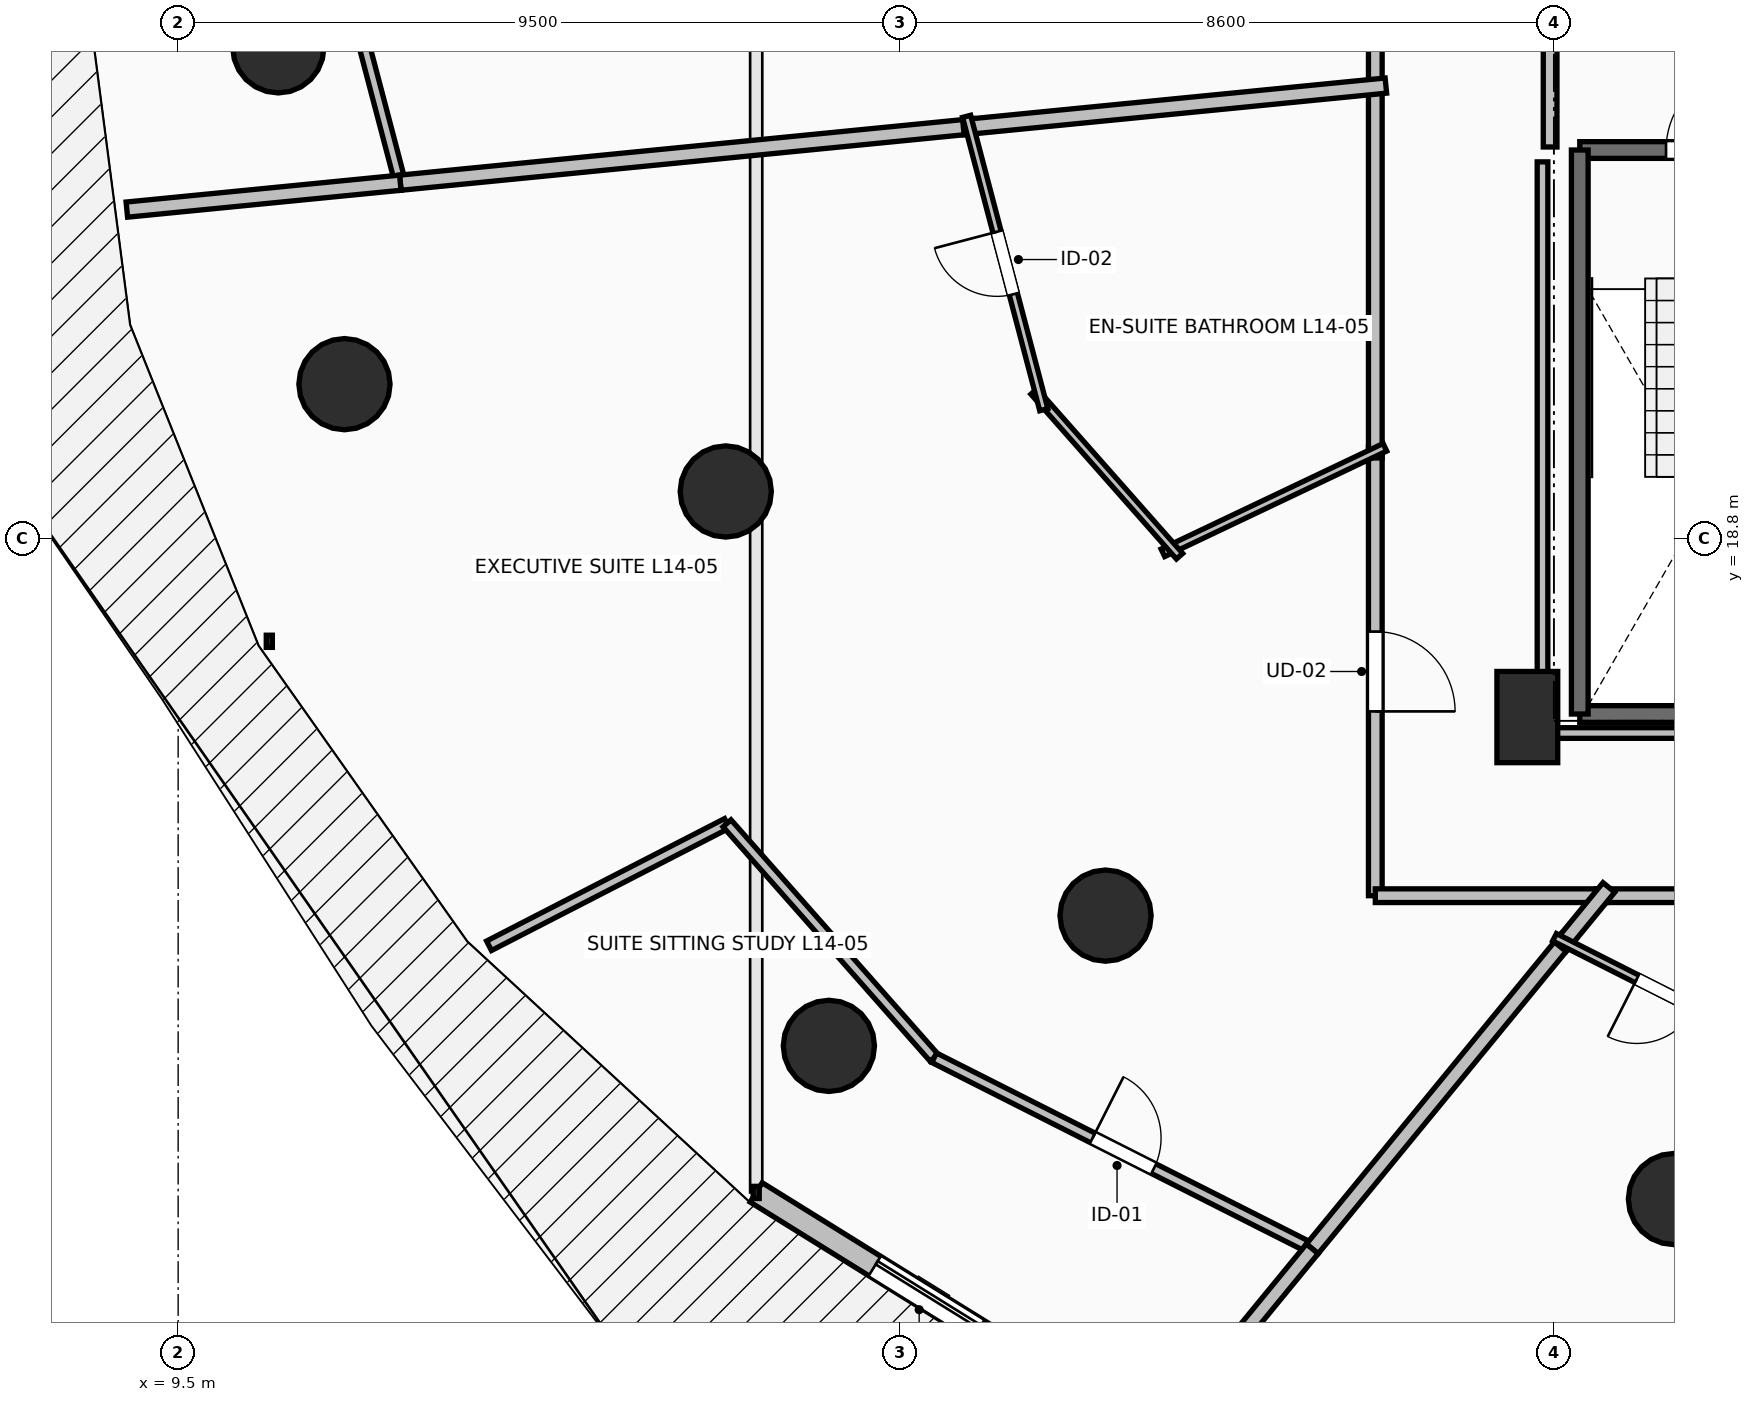
"""IFC4 building model, lengths in metres.
Left out: names, types, materials, properties, quantities, classifications, styles, units other than length and angle.
Written with IfcOpenShell. Run it as: python <this file> out.ifc"""

import sys

from ifc_helpers import new_model, si_unit, direction, frame, frame_2d, origin, origin_2d, place, context, subcontext, project, spatial, rectangle, circle, extrude, element, fill, save


model = new_model("IFC4")
c1 = context("Model", 3, precision=1e-05, world=origin(), true_north=direction((0.0, 1.0)))
c2 = subcontext(c1, "Body", "Model", "MODEL_VIEW")
j1 = project(units=[si_unit("LENGTHUNIT", "METRE"), si_unit("PLANEANGLEUNIT", "RADIAN")], contexts=[c1])
p1 = place(None, origin())
s1 = spatial("IfcSite", under=j1, at=p1, CompositionType="ELEMENT")
p2 = place(p1, origin())
s2 = spatial("IfcBuilding", under=s1, at=p2, CompositionType="ELEMENT")
p3 = place(p2, frame((0.0, 0.0, 55.5)))
s3 = spatial("IfcBuildingStorey", under=s2, at=p3, CompositionType="ELEMENT", Elevation=55.5)
for number, where, z_axis, x_axis in (
    (1, (16.705, 19.418, 0.0), (0.0, 0.0, 1.0), (-0.924, -0.383, 0.0)),
    (2, (21.701, 13.838, 0.0), (0.0, 0.0, 1.0), (-0.707, -0.707, 0.0)),
    (3, (29.179, 10.109, 0.0), (0.0, 0.0, 1.0), (-0.383, -0.924, 0.0)),
    (4, (10.818, 25.261, 0.0), (0.0, 0.0, 1.0), (-1.0, 0.0, 0.0)),
    (5, (11.688, 20.83, 0.0), (0.0, 0.0, 1.0), (-0.924, -0.383, 0.0)),
    (6, (18.061, 12.124, 0.0), (0.0, 0.0, 1.0), (-0.707, -0.707, 0.0)),
):
    element("IfcColumn", number, at=place(p3, frame(where, z_axis=z_axis, x_axis=x_axis)), inside=s3, PredefinedType="COLUMN", context=c2, shape_type="SweptSolid", body=[
        extrude(circle(Radius=0.6, at=origin_2d()), origin(), (0.0, 0.0, 1.0), 3.5),
    ])
p4 = place(p3, frame((27.25, 16.45, 0.0), z_axis=(0.0, 0.0, 1.0), x_axis=(1.0, 0.0, 0.0)))
e7 = element("IfcColumn", 7, at=p4, inside=s3, PredefinedType="PILASTER", context=c2, shape_type="SweptSolid", body=[
    extrude(rectangle(XDim=0.8, YDim=1.2, at=origin_2d()), origin(), (0.0, 0.0, 1.0), 3.5),
])
p5 = place(p3, frame((17.105, 10.196, 0.0), z_axis=(0.0, 0.0, 1.0), x_axis=(0.849633724826, -0.527373239404, 0.0)))
e8 = element("IfcWall", 8, at=p5, inside=s3, PredefinedType="STANDARD", context=c2, shape_type="SweptSolid", body=[
    extrude(rectangle(XDim=5.271, YDim=0.3, at=frame_2d((2.635, 0.0))), origin(), (0.0, 0.0, 1.0), 3.24),
])
p6 = place(p5, frame((1.835, 0.0, 0.0)))
e9 = element("IfcOpeningElement", 9, at=p6, cuts=e8, PredefinedType="OPENING", context=c2, shape_type="SweptSolid", body=[
    extrude(rectangle(XDim=1.6, YDim=2.3, at=frame_2d((0.8, 1.15))), frame((0.0, 0.165, 0.0), z_axis=(0.0, -1.0, 0.0), x_axis=(1.0, 0.0, 0.0)), (0.0, 0.0, 1.0), 0.33),
])
p7 = place(p3, frame((27.94, 23.91, 0.0), z_axis=(0.0, 0.0, 1.0), x_axis=(1.0, 0.0, 0.0)))
e10 = element("IfcWall", 10, at=p7, inside=s3, PredefinedType="SOLIDWALL", context=c2, shape_type="SweptSolid", body=[
    extrude(rectangle(XDim=3.37, YDim=0.22, at=frame_2d((1.685, 0.0))), origin(), (0.0, 0.0, 1.0), 3.24),
])
p8 = place(p7, frame((1.135, 0.0, 0.0)))
e11 = element("IfcOpeningElement", 11, at=p8, cuts=e10, PredefinedType="OPENING", context=c2, shape_type="SweptSolid", body=[
    extrude(rectangle(XDim=1.1, YDim=2.15, at=frame_2d((0.55, 1.075))), frame((0.0, 0.125, 0.0), z_axis=(0.0, -1.0, 0.0), x_axis=(1.0, 0.0, 0.0)), (0.0, 0.0, 1.0), 0.25),
])
p9 = place(p3, frame((31.31, 16.49, 0.0), z_axis=(0.0, 0.0, 1.0), x_axis=(-1.0, 0.0, 0.0)))
e12 = element("IfcWall", 12, at=p9, inside=s3, PredefinedType="SOLIDWALL", context=c2, shape_type="SweptSolid", body=[
    extrude(rectangle(XDim=3.37, YDim=0.22, at=frame_2d((1.685, 0.0))), origin(), (0.0, 0.0, 1.0), 3.24),
])
p10 = place(p3, frame((27.94, 16.49, 0.0), z_axis=(0.0, 0.0, 1.0), x_axis=(0.0, 1.0, 0.0)))
e13 = element("IfcWall", 13, at=p10, inside=s3, PredefinedType="SOLIDWALL", context=c2, shape_type="SweptSolid", body=[
    extrude(rectangle(XDim=7.42, YDim=0.22, at=frame_2d((3.71, 0.0))), origin(), (0.0, 0.0, 1.0), 3.24),
])
p11 = place(p3, frame((27.55, 28.0, 0.0), z_axis=(0.0, 0.0, 1.0), x_axis=(0.0, -1.0, 0.0)))
e14 = element("IfcWall", 14, at=p11, inside=s3, PredefinedType="PARTITIONING", context=c2, shape_type="SweptSolid", body=[
    extrude(rectangle(XDim=4.05, YDim=0.18, at=frame_2d((2.025, 0.0))), origin(), (0.0, 0.0, 1.0), 3.24),
])
p12 = place(p11, frame((1.425, 0.0, 0.0)))
e15 = element("IfcOpeningElement", 15, at=p12, cuts=e14, PredefinedType="OPENING", context=c2, shape_type="SweptSolid", body=[
    extrude(rectangle(XDim=1.2, YDim=2.15, at=frame_2d((0.6, 1.075))), frame((0.0, 0.105, 0.0), z_axis=(0.0, -1.0, 0.0), x_axis=(1.0, 0.0, 0.0)), (0.0, 0.0, 1.0), 0.21),
])
p13 = place(p3, frame((25.25, 30.598, 0.0), z_axis=(0.0, 0.0, 1.0), x_axis=(0.0, -1.0, 0.0)))
e16 = element("IfcWall", 16, at=p13, inside=s3, PredefinedType="PARTITIONING", context=c2, shape_type="SweptSolid", body=[
    extrude(rectangle(XDim=5.914, YDim=0.18, at=frame_2d((2.957, 0.0))), origin(), (0.0, 0.0, 1.0), 2.432),
])
p14 = place(p13, frame((2.432, 0.0, 0.0)))
e17 = element("IfcOpeningElement", 17, at=p14, cuts=e16, PredefinedType="OPENING", context=c2, shape_type="SweptSolid", body=[
    extrude(rectangle(XDim=1.05, YDim=2.2, at=frame_2d((0.525, 1.1))), frame((0.0, 0.105, 0.0), z_axis=(0.0, -1.0, 0.0), x_axis=(1.0, 0.0, 0.0)), (0.0, 0.0, 1.0), 0.21),
])
p15 = place(p3, frame((25.25, 19.999, 0.0), z_axis=(0.0, 0.0, 1.0), x_axis=(0.0, -1.0, 0.0)))
e18 = element("IfcWall", 18, at=p15, inside=s3, PredefinedType="PARTITIONING", context=c2, shape_type="SweptSolid", body=[
    extrude(rectangle(XDim=5.899, YDim=0.18, at=frame_2d((2.949, 0.0))), origin(), (0.0, 0.0, 1.0), 2.432),
])
p16 = place(p15, frame((2.425, 0.0, 0.0)))
e19 = element("IfcOpeningElement", 19, at=p16, cuts=e18, PredefinedType="OPENING", context=c2, shape_type="SweptSolid", body=[
    extrude(rectangle(XDim=1.05, YDim=2.2, at=frame_2d((0.525, 1.1))), frame((0.0, 0.105, 0.0), z_axis=(0.0, -1.0, 0.0), x_axis=(1.0, 0.0, 0.0)), (0.0, 0.0, 1.0), 0.21),
])
p17 = place(p3, frame((25.25, 14.1, 0.0), z_axis=(0.0, 0.0, 1.0), x_axis=(1.0, 0.0, 0.0)))
e20 = element("IfcWall", 20, at=p17, inside=s3, PredefinedType="PARTITIONING", context=c2, shape_type="SweptSolid", body=[
    extrude(rectangle(XDim=3.044, YDim=0.18, at=frame_2d((1.522, 0.0))), origin(), (0.0, 0.0, 1.0), 2.432),
])
p18 = place(p3, frame((25.25, 24.824, 0.0), z_axis=(0.0, 0.0, 1.0), x_axis=(0.0, -1.0, 0.0)))
e21 = element("IfcWall", 21, at=p18, inside=s3, PredefinedType="PARTITIONING", context=c2, shape_type="SweptSolid", body=[
    extrude(rectangle(XDim=4.965, YDim=0.18, at=frame_2d((2.482, 0.0))), origin(), (0.0, 0.0, 1.0), 3.24),
])
p19 = place(p3, frame((28.154, 14.1, 0.0), z_axis=(0.0, 0.0, 1.0), x_axis=(1.0, 0.0, 0.0)))
e22 = element("IfcWall", 22, at=p19, inside=s3, PredefinedType="PARTITIONING", context=c2, shape_type="SweptSolid", body=[
    extrude(rectangle(XDim=5.69, YDim=0.18, at=frame_2d((2.845, 0.0))), origin(), (0.0, 0.0, 1.0), 2.432),
])
p20 = place(p3, frame((11.76, 26.0, 0.0), z_axis=(0.0, 0.0, 1.0), x_axis=(0.254465628682, -0.967081818576, 0.0)))
e23 = element("IfcWall", 23, at=p20, inside=s3, PredefinedType="PARTITIONING", context=c2, shape_type="SweptSolid", body=[
    extrude(rectangle(XDim=2.606, YDim=0.14, at=frame_2d((1.303, 0.0))), origin(), (0.0, 0.0, 1.0), 2.432),
])
p21 = place(p3, frame((12.423, 23.48, 0.0), z_axis=(0.0, 0.0, 1.0), x_axis=(0.995173937517, 0.098126622721, 0.0)))
e24 = element("IfcWall", 24, at=p21, inside=s3, PredefinedType="PARTITIONING", context=c2, shape_type="SweptSolid", body=[
    extrude(rectangle(XDim=7.583, YDim=0.2, at=frame_2d((3.792, 0.0))), origin(), (0.0, 0.0, 1.0), 2.886),
])
p22 = place(p3, frame((19.831, 24.21, 0.0), z_axis=(0.0, 0.0, 1.0), x_axis=(0.995182391057, 0.098040851333, 0.0)))
e25 = element("IfcWall", 25, at=p22, inside=s3, PredefinedType="PARTITIONING", context=c2, shape_type="SweptSolid", body=[
    extrude(rectangle(XDim=5.585, YDim=0.2, at=frame_2d((2.793, 0.0))), origin(), (0.0, 0.0, 1.0), 2.929),
])
p23 = place(p3, frame((8.825, 23.126, 0.0), z_axis=(0.0, 0.0, 1.0), x_axis=(0.995195038103, 0.097912390097, 0.0)))
e26 = element("IfcWall", 26, at=p23, inside=s3, PredefinedType="PARTITIONING", context=c2, shape_type="SweptSolid", body=[
    extrude(rectangle(XDim=3.615, YDim=0.2, at=frame_2d((1.808, 0.0))), origin(), (0.0, 0.0, 1.0), 2.624),
])
p24 = place(p3, frame((25.376, 19.999, 0.0), z_axis=(0.0, 0.0, 1.0), x_axis=(-0.903186785932, -0.429247748647, 0.0)))
e27 = element("IfcWall", 27, at=p24, inside=s3, PredefinedType="PARTITIONING", context=c2, shape_type="SweptSolid", body=[
    extrude(rectangle(XDim=3.234, YDim=0.11, at=frame_2d((1.617, 0.0))), origin(), (0.0, 0.0, 1.0), 2.929),
])
p25 = place(p3, frame((22.675, 18.566, 0.0), z_axis=(0.0, 0.0, 1.0), x_axis=(-0.661981720099, 0.749519981224, 0.0)))
e28 = element("IfcWall", 28, at=p25, inside=s3, PredefinedType="PARTITIONING", context=c2, shape_type="SweptSolid", body=[
    extrude(rectangle(XDim=2.892, YDim=0.11, at=frame_2d((1.446, 0.0))), origin(), (0.0, 0.0, 1.0), 2.929),
])
p26 = place(p3, frame((20.889, 20.494, 0.0), z_axis=(0.0, 0.0, 1.0), x_axis=(-0.254405980461, 0.967097511684, 0.0)))
e29 = element("IfcWall", 29, at=p26, inside=s3, PredefinedType="PARTITIONING", context=c2, shape_type="SweptSolid", body=[
    extrude(rectangle(XDim=3.991, YDim=0.11, at=frame_2d((1.996, 0.0))), origin(), (0.0, 0.0, 1.0), 3.24),
])
p27 = place(p26, frame((1.571, 0.0, 0.0)))
e30 = element("IfcOpeningElement", 30, at=p27, cuts=e29, PredefinedType="OPENING", context=c2, shape_type="SweptSolid", body=[
    extrude(rectangle(XDim=0.85, YDim=2.1, at=frame_2d((0.425, 1.05))), frame((0.0, 0.07, 0.0), z_axis=(0.0, -1.0, 0.0), x_axis=(1.0, 0.0, 0.0)), (0.0, 0.0, 1.0), 0.14),
])
p28 = place(p3, frame((13.59, 13.441, 0.0), z_axis=(0.0, 0.0, 1.0), x_axis=(0.889180616302, 0.457556369852, 0.0)))
e31 = element("IfcWall", 31, at=p28, inside=s3, PredefinedType="PARTITIONING", context=c2, shape_type="SweptSolid", body=[
    extrude(rectangle(XDim=3.521, YDim=0.14, at=frame_2d((1.76, 0.0))), origin(), (0.0, 0.0, 1.0), 2.624),
])
p29 = place(p3, frame((16.721, 15.052, 0.0), z_axis=(0.0, 0.0, 1.0), x_axis=(0.662159063844, -0.749363312532, 0.0)))
e32 = element("IfcWall", 32, at=p29, inside=s3, PredefinedType="PARTITIONING", context=c2, shape_type="SweptSolid", body=[
    extrude(rectangle(XDim=4.115, YDim=0.14, at=frame_2d((2.058, 0.0))), origin(), (0.0, 0.0, 1.0), 2.432),
])
p30 = place(p3, frame((19.446, 11.968, 0.0), z_axis=(0.0, 0.0, 1.0), x_axis=(0.892518178955, -0.451011419184, 0.0)))
e33 = element("IfcWall", 33, at=p30, inside=s3, PredefinedType="PARTITIONING", context=c2, shape_type="SweptSolid", body=[
    extrude(rectangle(XDim=5.574, YDim=0.14, at=frame_2d((2.787, 0.0))), origin(), (0.0, 0.0, 1.0), 3.24),
])
p31 = place(p30, frame((2.337, 0.0, 0.0)))
e34 = element("IfcOpeningElement", 34, at=p31, cuts=e33, PredefinedType="OPENING", context=c2, shape_type="SweptSolid", body=[
    extrude(rectangle(XDim=0.9, YDim=2.1, at=frame_2d((0.45, 1.05))), frame((0.0, 0.085, 0.0), z_axis=(0.0, -1.0, 0.0), x_axis=(1.0, 0.0, 0.0)), (0.0, 0.0, 1.0), 0.17),
])
p32 = place(p3, frame((24.421, 9.454, 0.0), z_axis=(0.0, 0.0, 1.0), x_axis=(0.634420016008, 0.772988514332, 0.0)))
e35 = element("IfcWall", 35, at=p32, inside=s3, PredefinedType="PARTITIONING", context=c2, shape_type="SweptSolid", body=[
    extrude(rectangle(XDim=5.282, YDim=0.2, at=frame_2d((2.641, 0.0))), origin(), (0.0, 0.0, 1.0), 2.886),
])
p33 = place(p3, frame((27.683, 13.429, 0.0), z_axis=(0.0, 0.0, 1.0), x_axis=(0.634186727441, 0.77317992391, 0.0)))
e36 = element("IfcWall", 36, at=p33, inside=s3, PredefinedType="PARTITIONING", context=c2, shape_type="SweptSolid", body=[
    extrude(rectangle(XDim=1.008, YDim=0.2, at=frame_2d((0.504, 0.0))), origin(), (0.0, 0.0, 1.0), 2.432),
])
p34 = place(p3, frame((22.46, 7.065, 0.0), z_axis=(0.0, 0.0, 1.0), x_axis=(0.634432805544, 0.772978017313, 0.0)))
e37 = element("IfcWall", 37, at=p34, inside=s3, PredefinedType="PARTITIONING", context=c2, shape_type="SweptSolid", body=[
    extrude(rectangle(XDim=3.091, YDim=0.2, at=frame_2d((1.545, 0.0))), origin(), (0.0, 0.0, 1.0), 2.624),
])
p35 = place(p3, frame((30.533, 12.075, 0.0), z_axis=(0.0, 0.0, 1.0), x_axis=(-0.892451870397, 0.451142614952, 0.0)))
e38 = element("IfcWall", 38, at=p35, inside=s3, PredefinedType="PARTITIONING", context=c2, shape_type="SweptSolid", body=[
    extrude(rectangle(XDim=3.277, YDim=0.11, at=frame_2d((1.639, 0.0))), origin(), (0.0, 0.0, 1.0), 2.432),
])
p36 = place(p35, frame((1.214, 0.0, 0.0)))
e39 = element("IfcOpeningElement", 39, at=p36, cuts=e38, PredefinedType="OPENING", context=c2, shape_type="SweptSolid", body=[
    extrude(rectangle(XDim=0.85, YDim=2.1, at=frame_2d((0.425, 1.05))), frame((0.0, 0.07, 0.0), z_axis=(0.0, -1.0, 0.0), x_axis=(1.0, 0.0, 0.0)), (0.0, 0.0, 1.0), 0.14),
])
p37 = place(p3, frame((31.195, 16.24, 0.0), z_axis=(0.0, 0.0, 1.0), x_axis=(-1.0, 0.0, 0.0)))
e40 = element("IfcWall", 40, at=p37, inside=s3, PredefinedType="PARTITIONING", context=c2, shape_type="SweptSolid", body=[
    extrude(rectangle(XDim=3.745, YDim=0.14, at=frame_2d((1.873, 0.0))), origin(), (0.0, 0.0, 1.0), 2.432),
])
p38 = place(p3, frame((27.45, 16.24, 0.0), z_axis=(0.0, 0.0, 1.0), x_axis=(0.0, 1.0, 0.0)))
e41 = element("IfcWall", 41, at=p38, inside=s3, PredefinedType="PARTITIONING", context=c2, shape_type="SweptSolid", body=[
    extrude(rectangle(XDim=7.514, YDim=0.14, at=frame_2d((3.757, 0.0))), origin(), (0.0, 0.0, 1.0), 2.432),
])
p39 = place(p6, origin())
e42 = element("IfcDoor", 42, at=p39, inside=s3, OperationType="SLIDING_TO_LEFT", PredefinedType="DOOR", context=c2, shape_type="SweptSolid", body=[
    extrude(rectangle(XDim=1.6, YDim=2.3, at=frame_2d((0.8, 1.15))), frame((0.0, 0.025, 0.0), z_axis=(0.0, -1.0, 0.0), x_axis=(1.0, 0.0, 0.0)), (0.0, 0.0, 1.0), 0.05),
])
fill(e9, e42)
p40 = place(p8, origin())
e43 = element("IfcDoor", 43, at=p40, inside=s3, OperationType="SINGLE_SWING_RIGHT", PredefinedType="DOOR", context=c2, shape_type="SweptSolid", body=[
    extrude(rectangle(XDim=1.1, YDim=2.15, at=frame_2d((0.55, 1.075))), frame((0.0, 0.025, 0.0), z_axis=(0.0, -1.0, 0.0), x_axis=(1.0, 0.0, 0.0)), (0.0, 0.0, 1.0), 0.05),
])
fill(e11, e43)
p41 = place(p16, origin())
e44 = element("IfcDoor", 44, at=p41, inside=s3, OperationType="SINGLE_SWING_RIGHT", PredefinedType="DOOR", context=c2, shape_type="SweptSolid", body=[
    extrude(rectangle(XDim=1.05, YDim=2.2, at=frame_2d((0.525, 1.1))), frame((0.0, 0.025, 0.0), z_axis=(0.0, -1.0, 0.0), x_axis=(1.0, 0.0, 0.0)), (0.0, 0.0, 1.0), 0.05),
])
fill(e19, e44)
p42 = place(p27, origin())
e45 = element("IfcDoor", 45, at=p42, inside=s3, OperationType="SINGLE_SWING_RIGHT", PredefinedType="DOOR", context=c2, shape_type="SweptSolid", body=[
    extrude(rectangle(XDim=0.85, YDim=2.1, at=frame_2d((0.425, 1.05))), frame((0.0, 0.025, 0.0), z_axis=(0.0, -1.0, 0.0), x_axis=(1.0, 0.0, 0.0)), (0.0, 0.0, 1.0), 0.05),
])
fill(e30, e45)
p43 = place(p31, origin())
e46 = element("IfcDoor", 46, at=p43, inside=s3, OperationType="SINGLE_SWING_LEFT", PredefinedType="DOOR", context=c2, shape_type="SweptSolid", body=[
    extrude(rectangle(XDim=0.9, YDim=2.1, at=frame_2d((0.45, 1.05))), frame((0.0, 0.025, 0.0), z_axis=(0.0, -1.0, 0.0), x_axis=(1.0, 0.0, 0.0)), (0.0, 0.0, 1.0), 0.05),
])
fill(e34, e46)
p44 = place(p36, origin())
e47 = element("IfcDoor", 47, at=p44, inside=s3, OperationType="SINGLE_SWING_RIGHT", PredefinedType="DOOR", context=c2, shape_type="SweptSolid", body=[
    extrude(rectangle(XDim=0.85, YDim=2.1, at=frame_2d((0.425, 1.05))), frame((0.0, 0.025, 0.0), z_axis=(0.0, -1.0, 0.0), x_axis=(1.0, 0.0, 0.0)), (0.0, 0.0, 1.0), 0.05),
])
fill(e39, e47)
save(model, sys.argv[1])
